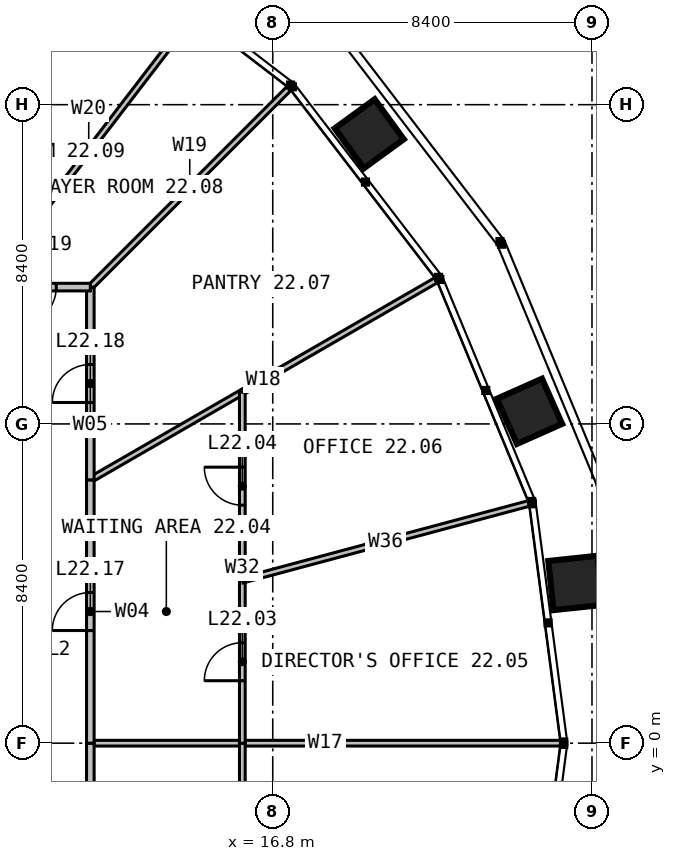
"""IFC4 building model, lengths in metres.
Left out: names, types, materials, properties, quantities, classifications, styles, units other than length and angle.
Written with IfcOpenShell. Run it as: python <this file> out.ifc"""

import sys

from ifc_helpers import new_model, si_unit, direction, frame, frame_2d, origin, place, context, subcontext, project, spatial, rectangle, extrude, element, fill, save


model = new_model("IFC4")
c1 = context("Model", 3, precision=1e-05, world=origin(), true_north=direction((0.0, 1.0)))
c2 = subcontext(c1, "Body", "Model", "MODEL_VIEW")
j1 = project(units=[si_unit("LENGTHUNIT", "METRE"), si_unit("PLANEANGLEUNIT", "RADIAN")], contexts=[c1])
p1 = place(None, origin())
s1 = spatial("IfcSite", under=j1, at=p1, CompositionType="ELEMENT")
p2 = place(p1, origin())
s2 = spatial("IfcBuilding", under=s1, at=p2, CompositionType="ELEMENT")
p3 = place(p2, frame((0.0, 0.0, 94.0)))
s3 = spatial("IfcBuildingStorey", under=s2, at=p3, CompositionType="ELEMENT", Elevation=94.0)
p4 = place(p3, frame((12.0, 0.0, 0.0), z_axis=(0.0, 0.0, 1.0), x_axis=(1.0, 0.0, 0.0)))
e1 = element("IfcWall", 1, at=p4, inside=s3, PredefinedType="PARTITIONING", context=c2, shape_type="SweptSolid", body=[
    extrude(rectangle(XDim=12.37, YDim=0.15, at=frame_2d((6.185, 0.0))), origin(), (0.0, 0.0, 1.0), 2.79),
])
p5 = place(p3, frame((12.0, 6.928, 0.0), z_axis=(0.0, 0.0, 1.0), x_axis=(0.866028201971, 0.499995153367, 0.0)))
e2 = element("IfcWall", 2, at=p5, inside=s3, PredefinedType="PARTITIONING", context=c2, shape_type="SweptSolid", body=[
    extrude(rectangle(XDim=10.514, YDim=0.15, at=frame_2d((5.257, 0.0))), origin(), (0.0, 0.0, 1.0), 2.79),
])
p6 = place(p3, frame((12.0, 12.0, 0.0), z_axis=(0.0, 0.0, 1.0), x_axis=(0.707106781187, 0.707106781187, 0.0)))
e3 = element("IfcWall", 3, at=p6, inside=s3, PredefinedType="PARTITIONING", context=c2, shape_type="SweptSolid", body=[
    extrude(rectangle(XDim=7.4, YDim=0.15, at=frame_2d((3.7, 0.0))), origin(), (0.0, 0.0, 1.0), 2.79),
])
p7 = place(p3, frame((9.208, 12.0, 0.0), z_axis=(0.0, 0.0, 1.0), x_axis=(0.60876104896, 0.793353631913, 0.0)))
e4 = element("IfcWall", 4, at=p7, inside=s3, PredefinedType="PARTITIONING", context=c2, shape_type="SweptSolid", body=[
    extrude(rectangle(XDim=9.036, YDim=0.15, at=frame_2d((4.518, 0.0))), origin(), (0.0, 0.0, 1.0), 2.79),
])
p8 = place(p3, frame((6.928, 12.0, 0.0), z_axis=(0.0, 0.0, 1.0), x_axis=(0.499995153367, 0.866028201971, 0.0)))
e5 = element("IfcWall", 5, at=p8, inside=s3, PredefinedType="PARTITIONING", context=c2, shape_type="SweptSolid", body=[
    extrude(rectangle(XDim=10.514, YDim=0.15, at=frame_2d((5.257, 0.0))), origin(), (0.0, 0.0, 1.0), 2.79),
])
p9 = place(p3, frame((16.0, -9.238, 0.0), z_axis=(0.0, 0.0, 1.0), x_axis=(0.0, 1.0, 0.0)))
e6 = element("IfcWall", 6, at=p9, inside=s3, PredefinedType="PARTITIONING", context=c2, shape_type="SweptSolid", body=[
    extrude(rectangle(XDim=9.238, YDim=0.15, at=frame_2d((4.619, 0.0))), origin(), (0.0, 0.0, 1.0), 2.79),
])
p10 = place(p9, frame((0.805, 0.0, 0.0)))
e7 = element("IfcOpeningElement", 7, at=p10, cuts=e6, PredefinedType="OPENING", context=c2, shape_type="SweptSolid", body=[
    extrude(rectangle(XDim=1.0, YDim=2.2, at=frame_2d((0.5, 1.1))), frame((0.0, 0.085, 0.0), z_axis=(0.0, -1.0, 0.0), x_axis=(1.0, 0.0, 0.0)), (0.0, 0.0, 1.0), 0.17),
])
p11 = place(p9, frame((5.424, 0.0, 0.0)))
e8 = element("IfcOpeningElement", 8, at=p11, cuts=e6, PredefinedType="OPENING", context=c2, shape_type="SweptSolid", body=[
    extrude(rectangle(XDim=1.0, YDim=2.2, at=frame_2d((0.5, 1.1))), frame((0.0, 0.085, 0.0), z_axis=(0.0, -1.0, 0.0), x_axis=(1.0, 0.0, 0.0)), (0.0, 0.0, 1.0), 0.17),
])
p12 = place(p3, frame((12.0, -6.928, 0.0), z_axis=(0.0, 0.0, 1.0), x_axis=(0.0, 1.0, 0.0)))
e9 = element("IfcWall", 9, at=p12, inside=s3, PredefinedType="PARTITIONING", context=c2, shape_type="SweptSolid", body=[
    extrude(rectangle(XDim=6.928, YDim=0.2, at=frame_2d((3.464, 0.0))), origin(), (0.0, 0.0, 1.0), 3.8),
])
p13 = place(p12, frame((2.964, 0.0, 0.0)))
e10 = element("IfcOpeningElement", 10, at=p13, cuts=e9, PredefinedType="OPENING", context=c2, shape_type="SweptSolid", body=[
    extrude(rectangle(XDim=1.0, YDim=2.2, at=frame_2d((0.5, 1.1))), frame((0.0, 0.11, 0.0), z_axis=(0.0, -1.0, 0.0), x_axis=(1.0, 0.0, 0.0)), (0.0, 0.0, 1.0), 0.22),
])
p14 = place(p3, frame((16.0, 0.0, 0.0), z_axis=(0.0, 0.0, 1.0), x_axis=(0.0, 1.0, 0.0)))
e11 = element("IfcWall", 11, at=p14, inside=s3, PredefinedType="PARTITIONING", context=c2, shape_type="SweptSolid", body=[
    extrude(rectangle(XDim=9.238, YDim=0.15, at=frame_2d((4.619, 0.0))), origin(), (0.0, 0.0, 1.0), 2.79),
])
p15 = place(p14, frame((1.644, 0.0, 0.0)))
e12 = element("IfcOpeningElement", 12, at=p15, cuts=e11, PredefinedType="OPENING", context=c2, shape_type="SweptSolid", body=[
    extrude(rectangle(XDim=1.0, YDim=2.2, at=frame_2d((0.5, 1.1))), frame((0.0, 0.085, 0.0), z_axis=(0.0, -1.0, 0.0), x_axis=(1.0, 0.0, 0.0)), (0.0, 0.0, 1.0), 0.17),
])
p16 = place(p14, frame((6.262, 0.0, 0.0)))
e13 = element("IfcOpeningElement", 13, at=p16, cuts=e11, PredefinedType="OPENING", context=c2, shape_type="SweptSolid", body=[
    extrude(rectangle(XDim=1.0, YDim=2.2, at=frame_2d((0.5, 1.1))), frame((0.0, 0.085, 0.0), z_axis=(0.0, -1.0, 0.0), x_axis=(1.0, 0.0, 0.0)), (0.0, 0.0, 1.0), 0.17),
])
p17 = place(p3, frame((16.0, 4.287, 0.0), z_axis=(0.0, 0.0, 1.0), x_axis=(0.965926412025, 0.258816859097, 0.0)))
e14 = element("IfcWall", 14, at=p17, inside=s3, PredefinedType="PARTITIONING", context=c2, shape_type="SweptSolid", body=[
    extrude(rectangle(XDim=7.806, YDim=0.15, at=frame_2d((3.903, 0.0))), origin(), (0.0, 0.0, 1.0), 2.79),
])
p18 = place(p3, frame((12.0, 0.0, 0.0), z_axis=(0.0, 0.0, 1.0), x_axis=(0.0, 1.0, 0.0)))
e15 = element("IfcWall", 15, at=p18, inside=s3, PredefinedType="PARTITIONING", context=c2, shape_type="SweptSolid", body=[
    extrude(rectangle(XDim=6.928, YDim=0.2, at=frame_2d((3.464, 0.0))), origin(), (0.0, 0.0, 1.0), 3.8),
])
p19 = place(p18, frame((2.964, 0.0, 0.0)))
e16 = element("IfcOpeningElement", 16, at=p19, cuts=e15, PredefinedType="OPENING", context=c2, shape_type="SweptSolid", body=[
    extrude(rectangle(XDim=1.0, YDim=2.2, at=frame_2d((0.5, 1.1))), frame((0.0, 0.11, 0.0), z_axis=(0.0, -1.0, 0.0), x_axis=(1.0, 0.0, 0.0)), (0.0, 0.0, 1.0), 0.22),
])
p20 = place(p3, frame((12.0, 6.928, 0.0), z_axis=(0.0, 0.0, 1.0), x_axis=(0.0, 1.0, 0.0)))
e17 = element("IfcWall", 17, at=p20, inside=s3, PredefinedType="PARTITIONING", context=c2, shape_type="SweptSolid", body=[
    extrude(rectangle(XDim=5.072, YDim=0.2, at=frame_2d((2.536, 0.0))), origin(), (0.0, 0.0, 1.0), 3.8),
])
p21 = place(p20, frame((2.036, 0.0, 0.0)))
e18 = element("IfcOpeningElement", 18, at=p21, cuts=e17, PredefinedType="OPENING", context=c2, shape_type="SweptSolid", body=[
    extrude(rectangle(XDim=1.0, YDim=2.2, at=frame_2d((0.5, 1.1))), frame((0.0, 0.11, 0.0), z_axis=(0.0, -1.0, 0.0), x_axis=(1.0, 0.0, 0.0)), (0.0, 0.0, 1.0), 0.22),
])
p22 = place(p3, frame((12.0, 12.0, 0.0), z_axis=(0.0, 0.0, 1.0), x_axis=(-1.0, 0.0, 0.0)))
e19 = element("IfcWall", 19, at=p22, inside=s3, PredefinedType="PARTITIONING", context=c2, shape_type="SweptSolid", body=[
    extrude(rectangle(XDim=2.792, YDim=0.2, at=frame_2d((1.396, 0.0))), origin(), (0.0, 0.0, 1.0), 3.8),
])
p23 = place(p22, frame((0.896, 0.0, 0.0)))
e20 = element("IfcOpeningElement", 20, at=p23, cuts=e19, PredefinedType="OPENING", context=c2, shape_type="SweptSolid", body=[
    extrude(rectangle(XDim=1.0, YDim=2.2, at=frame_2d((0.5, 1.1))), frame((0.0, 0.11, 0.0), z_axis=(0.0, -1.0, 0.0), x_axis=(1.0, 0.0, 0.0)), (0.0, 0.0, 1.0), 0.22),
])
p24 = place(p15, origin())
e21 = element("IfcDoor", 21, at=p24, inside=s3, OperationType="SINGLE_SWING_LEFT", PredefinedType="DOOR", context=c2, shape_type="SweptSolid", body=[
    extrude(rectangle(XDim=1.0, YDim=2.2, at=frame_2d((0.5, 1.1))), frame((0.0, 0.025, 0.0), z_axis=(0.0, -1.0, 0.0), x_axis=(1.0, 0.0, 0.0)), (0.0, 0.0, 1.0), 0.05),
])
fill(e12, e21)
p25 = place(p16, origin())
e22 = element("IfcDoor", 22, at=p25, inside=s3, OperationType="SINGLE_SWING_RIGHT", PredefinedType="DOOR", context=c2, shape_type="SweptSolid", body=[
    extrude(rectangle(XDim=1.0, YDim=2.2, at=frame_2d((0.5, 1.1))), frame((0.0, 0.025, 0.0), z_axis=(0.0, -1.0, 0.0), x_axis=(1.0, 0.0, 0.0)), (0.0, 0.0, 1.0), 0.05),
])
fill(e13, e22)
p26 = place(p19, origin())
e23 = element("IfcDoor", 23, at=p26, inside=s3, OperationType="SINGLE_SWING_LEFT", PredefinedType="DOOR", context=c2, shape_type="SweptSolid", body=[
    extrude(rectangle(XDim=1.0, YDim=2.2, at=frame_2d((0.5, 1.1))), frame((0.0, 0.025, 0.0), z_axis=(0.0, -1.0, 0.0), x_axis=(1.0, 0.0, 0.0)), (0.0, 0.0, 1.0), 0.05),
])
fill(e16, e23)
p27 = place(p21, origin())
e24 = element("IfcDoor", 24, at=p27, inside=s3, OperationType="SINGLE_SWING_LEFT", PredefinedType="DOOR", context=c2, shape_type="SweptSolid", body=[
    extrude(rectangle(XDim=1.0, YDim=2.2, at=frame_2d((0.5, 1.1))), frame((0.0, 0.025, 0.0), z_axis=(0.0, -1.0, 0.0), x_axis=(1.0, 0.0, 0.0)), (0.0, 0.0, 1.0), 0.05),
])
fill(e18, e24)
p28 = place(p23, origin())
e25 = element("IfcDoor", 25, at=p28, inside=s3, OperationType="SINGLE_SWING_RIGHT", PredefinedType="DOOR", context=c2, shape_type="SweptSolid", body=[
    extrude(rectangle(XDim=1.0, YDim=2.2, at=frame_2d((0.5, 1.1))), frame((0.0, 0.025, 0.0), z_axis=(0.0, -1.0, 0.0), x_axis=(1.0, 0.0, 0.0)), (0.0, 0.0, 1.0), 0.05),
])
fill(e20, e25)
save(model, sys.argv[1])
